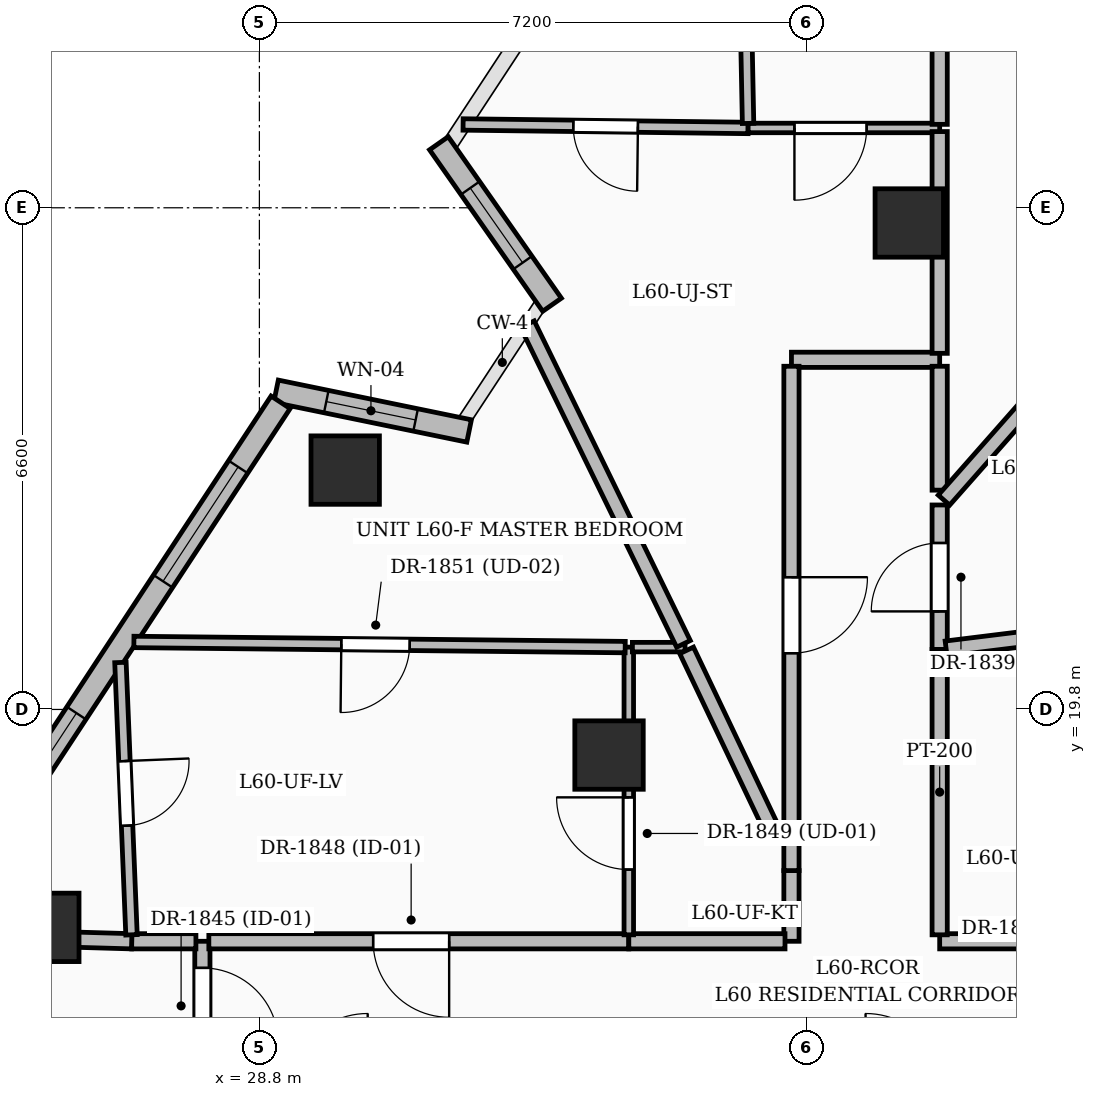
"""IFC4 building model, lengths in metres.
Left out: names, types, materials, properties, quantities, classifications, styles, units other than length and angle.
Written with IfcOpenShell. Run it as: python <this file> out.ifc"""

import sys

from ifc_helpers import new_model, si_unit, direction, frame, frame_2d, origin, origin_2d, place, context, subcontext, project, spatial, rectangle, extrude, element, fill, save


model = new_model("IFC4")
c1 = context("Model", 3, precision=1e-05, world=origin(), true_north=direction((0.0, 1.0)))
c2 = subcontext(c1, "Body", "Model", "MODEL_VIEW")
j1 = project(units=[si_unit("LENGTHUNIT", "METRE"), si_unit("PLANEANGLEUNIT", "RADIAN")], contexts=[c1])
p1 = place(None, origin())
s1 = spatial("IfcSite", under=j1, at=p1, CompositionType="ELEMENT")
p2 = place(p1, origin())
s2 = spatial("IfcBuilding", under=s1, at=p2, CompositionType="ELEMENT")
p3 = place(p2, frame((0.0, 0.0, 233.25)))
s3 = spatial("IfcBuildingStorey", under=s2, at=p3, CompositionType="ELEMENT", Elevation=233.25)
for number, where, z_axis, x_axis in (
    (1, (37.35, 26.2, 0.0), (0.0, 0.0, 1.0), (1.0, 0.0, 0.0)),
    (2, (33.4, 19.2, 0.0), (0.0, 0.0, 1.0), (1.0, 0.0, 0.0)),
    (3, (29.929, 22.949, 0.0), (0.0, 0.0, 1.0), (1.0, 0.0, 0.0)),
    (4, (25.977, 16.933, 0.0), (0.0, 0.0, 1.0), (1.0, 0.0, 0.0)),
):
    element("IfcColumn", number, at=place(p3, frame(where, z_axis=z_axis, x_axis=x_axis)), inside=s3, PredefinedType="COLUMN", context=c2, shape_type="SweptSolid", body=[
        extrude(rectangle(XDim=0.9, YDim=0.9, at=origin_2d()), origin(), (0.0, 0.0, 1.0), 3.75),
    ])
p4 = place(p3, frame((29.019, 23.986, 0.0), z_axis=(0.0, 0.0, 1.0), x_axis=(0.97951660883, -0.201363385515, 0.0)))
e5 = element("IfcWall", 5, at=p4, inside=s3, PredefinedType="SOLIDWALL", context=c2, shape_type="SweptSolid", body=[
    extrude(rectangle(XDim=2.594, YDim=0.3, at=frame_2d((1.297, 0.0))), origin(), (0.0, 0.0, 1.0), 2.825),
])
p5 = place(p4, frame((0.675, 0.0, 0.8)))
e6 = element("IfcOpeningElement", 6, at=p5, cuts=e5, PredefinedType="OPENING", context=c2, shape_type="SweptSolid", body=[
    extrude(rectangle(XDim=1.2, YDim=1.8, at=frame_2d((0.6, 0.9))), frame((0.0, 0.16, 0.0), z_axis=(0.0, -1.0, 0.0), x_axis=(1.0, 0.0, 0.0)), (0.0, 0.0, 1.0), 0.32),
])
p6 = place(p3, frame((32.65, 25.125, 0.0), z_axis=(0.0, 0.0, 1.0), x_axis=(-0.573967598523, 0.818878010356, 0.0)))
e7 = element("IfcWall", 7, at=p6, inside=s3, PredefinedType="SOLIDWALL", context=c2, shape_type="SweptSolid", body=[
    extrude(rectangle(XDim=2.594, YDim=0.3, at=frame_2d((1.297, 0.0))), origin(), (0.0, 0.0, 1.0), 2.825),
])
p7 = place(p6, frame((0.675, 0.0, 0.8)))
e8 = element("IfcOpeningElement", 8, at=p7, cuts=e7, PredefinedType="OPENING", context=c2, shape_type="SweptSolid", body=[
    extrude(rectangle(XDim=1.2, YDim=1.8, at=frame_2d((0.6, 0.9))), frame((0.0, 0.16, 0.0), z_axis=(0.0, -1.0, 0.0), x_axis=(1.0, 0.0, 0.0)), (0.0, 0.0, 1.0), 0.32),
])
p8 = place(p3, frame((25.062, 17.725, 0.0), z_axis=(0.0, 0.0, 1.0), x_axis=(0.549051383212, 0.835788596831, 0.0)))
e9 = element("IfcWall", 9, at=p8, inside=s3, PredefinedType="SOLIDWALL", context=c2, shape_type="SweptSolid", body=[
    extrude(rectangle(XDim=7.317, YDim=0.3, at=frame_2d((3.659, 0.0))), origin(), (0.0, 0.0, 1.0), 3.5),
])
p9 = place(p8, frame((0.625, 0.0, 0.6)))
e10 = element("IfcOpeningElement", 10, at=p9, cuts=e9, PredefinedType="OPENING", context=c2, shape_type="SweptSolid", body=[
    extrude(rectangle(XDim=1.8, YDim=2.1, at=frame_2d((0.9, 1.05))), frame((0.0, 0.16, 0.0), z_axis=(0.0, -1.0, 0.0), x_axis=(1.0, 0.0, 0.0)), (0.0, 0.0, 1.0), 0.32),
])
p10 = place(p8, frame((4.5, 0.0, 0.6)))
e11 = element("IfcOpeningElement", 11, at=p10, cuts=e9, PredefinedType="OPENING", context=c2, shape_type="SweptSolid", body=[
    extrude(rectangle(XDim=1.8, YDim=2.1, at=frame_2d((0.9, 1.05))), frame((0.0, 0.16, 0.0), z_axis=(0.0, -1.0, 0.0), x_axis=(1.0, 0.0, 0.0)), (0.0, 0.0, 1.0), 0.32),
])
p11 = place(p3, frame((28.05, 16.75, 0.0), z_axis=(0.0, 0.0, 1.0), x_axis=(0.0, -1.0, 0.0)))
e12 = element("IfcWall", 12, at=p11, inside=s3, PredefinedType="PARTITIONING", context=c2, shape_type="SweptSolid", body=[
    extrude(rectangle(XDim=1.7, YDim=0.2, at=frame_2d((0.85, 0.0))), origin(), (0.0, 0.0, 1.0), 3.5),
])
p12 = place(p11, frame((0.35, 0.0, 0.0)))
e13 = element("IfcOpeningElement", 13, at=p12, cuts=e12, PredefinedType="OPENING", context=c2, shape_type="SweptSolid", body=[
    extrude(rectangle(XDim=1.0, YDim=2.2, at=frame_2d((0.5, 1.1))), frame((0.0, 0.11, 0.0), z_axis=(0.0, -1.0, 0.0), x_axis=(1.0, 0.0, 0.0)), (0.0, 0.0, 1.0), 0.22),
])
p13 = place(p3, frame((33.66, 16.75, 0.0), z_axis=(0.0, 0.0, 1.0), x_axis=(-1.0, 0.0, 0.0)))
e14 = element("IfcWall", 14, at=p13, inside=s3, PredefinedType="PARTITIONING", context=c2, shape_type="SweptSolid", body=[
    extrude(rectangle(XDim=5.525, YDim=0.2, at=frame_2d((2.762, 0.0))), origin(), (0.0, 0.0, 1.0), 3.5),
])
p14 = place(p13, frame((2.364, 0.0, 0.0)))
e15 = element("IfcOpeningElement", 15, at=p14, cuts=e14, PredefinedType="OPENING", context=c2, shape_type="SweptSolid", body=[
    extrude(rectangle(XDim=1.0, YDim=2.2, at=frame_2d((0.5, 1.1))), frame((0.0, 0.11, 0.0), z_axis=(0.0, -1.0, 0.0), x_axis=(1.0, 0.0, 0.0)), (0.0, 0.0, 1.0), 0.22),
])
p15 = place(p3, frame((35.8, 17.68, 0.0), z_axis=(0.0, 0.0, 1.0), x_axis=(0.0, -1.0, 0.0)))
e16 = element("IfcWall", 16, at=p15, inside=s3, PredefinedType="PARTITIONING", context=c2, shape_type="SweptSolid", body=[
    extrude(rectangle(XDim=0.93, YDim=0.2, at=frame_2d((0.465, 0.0))), origin(), (0.0, 0.0, 1.0), 3.5),
])
p16 = place(p3, frame((35.715, 16.75, 0.0), z_axis=(0.0, 0.0, 1.0), x_axis=(-1.0, 0.0, 0.0)))
e17 = element("IfcWall", 17, at=p16, inside=s3, PredefinedType="PARTITIONING", context=c2, shape_type="SweptSolid", body=[
    extrude(rectangle(XDim=2.055, YDim=0.2, at=frame_2d((1.028, 0.0))), origin(), (0.0, 0.0, 1.0), 2.685),
])
p17 = place(p3, frame((39.96, 16.75, 0.0), z_axis=(0.0, 0.0, 1.0), x_axis=(-1.0, 0.0, 0.0)))
e18 = element("IfcWall", 18, at=p17, inside=s3, PredefinedType="PARTITIONING", context=c2, shape_type="SweptSolid", body=[
    extrude(rectangle(XDim=2.21, YDim=0.2, at=frame_2d((1.105, 0.0))), origin(), (0.0, 0.0, 1.0), 3.5),
])
p18 = place(p3, frame((37.75, 16.835, 0.0), z_axis=(0.0, 0.0, 1.0), x_axis=(0.0, 1.0, 0.0)))
e19 = element("IfcWall", 19, at=p18, inside=s3, PredefinedType="PARTITIONING", context=c2, shape_type="SweptSolid", body=[
    extrude(rectangle(XDim=3.755, YDim=0.2, at=frame_2d((1.877, 0.0))), origin(), (0.0, 0.0, 1.0), 3.5),
])
p19 = place(p3, frame((37.75, 20.59, 0.0), z_axis=(0.0, 0.0, 1.0), x_axis=(0.0, 1.0, 0.0)))
e20 = element("IfcWall", 20, at=p19, inside=s3, PredefinedType="PARTITIONING", context=c2, shape_type="SweptSolid", body=[
    extrude(rectangle(XDim=1.9, YDim=0.2, at=frame_2d((0.95, 0.0))), origin(), (0.0, 0.0, 1.0), 3.5),
])
p20 = place(p19, frame((0.5, 0.0, 0.0)))
e21 = element("IfcOpeningElement", 21, at=p20, cuts=e20, PredefinedType="OPENING", context=c2, shape_type="SweptSolid", body=[
    extrude(rectangle(XDim=0.9, YDim=2.1, at=frame_2d((0.45, 1.05))), frame((0.0, 0.11, 0.0), z_axis=(0.0, -1.0, 0.0), x_axis=(1.0, 0.0, 0.0)), (0.0, 0.0, 1.0), 0.22),
])
p21 = place(p3, frame((37.75, 24.4, 0.0), z_axis=(0.0, 0.0, 1.0), x_axis=(-1.0, 0.0, 0.0)))
e22 = element("IfcWall", 22, at=p21, inside=s3, PredefinedType="PARTITIONING", context=c2, shape_type="SweptSolid", body=[
    extrude(rectangle(XDim=1.95, YDim=0.2, at=frame_2d((0.975, 0.0))), origin(), (0.0, 0.0, 1.0), 2.685),
])
p22 = place(p3, frame((35.8, 24.315, 0.0), z_axis=(0.0, 0.0, 1.0), x_axis=(0.0, -1.0, 0.0)))
e23 = element("IfcWall", 23, at=p22, inside=s3, PredefinedType="PARTITIONING", context=c2, shape_type="SweptSolid", body=[
    extrude(rectangle(XDim=6.635, YDim=0.2, at=frame_2d((3.317, 0.0))), origin(), (0.0, 0.0, 1.0), 2.685),
])
p23 = place(p22, frame((2.775, 0.0, 0.0)))
e24 = element("IfcOpeningElement", 24, at=p23, cuts=e23, PredefinedType="OPENING", context=c2, shape_type="SweptSolid", body=[
    extrude(rectangle(XDim=1.0, YDim=2.2, at=frame_2d((0.5, 1.1))), frame((0.0, 0.11, 0.0), z_axis=(0.0, -1.0, 0.0), x_axis=(1.0, 0.0, 0.0)), (0.0, 0.0, 1.0), 0.22),
])
p24 = place(p3, frame((37.75, 22.685, 0.0), z_axis=(0.0, 0.0, 1.0), x_axis=(0.0, 1.0, 0.0)))
e25 = element("IfcWall", 25, at=p24, inside=s3, PredefinedType="PARTITIONING", context=c2, shape_type="SweptSolid", body=[
    extrude(rectangle(XDim=1.63, YDim=0.2, at=frame_2d((0.815, 0.0))), origin(), (0.0, 0.0, 1.0), 3.5),
])
p25 = place(p3, frame((27.965, 16.75, 0.0), z_axis=(0.0, 0.0, 1.0), x_axis=(-1.0, 0.0, 0.0)))
e26 = element("IfcWall", 26, at=p25, inside=s3, PredefinedType="PARTITIONING", context=c2, shape_type="SweptSolid", body=[
    extrude(rectangle(XDim=0.845, YDim=0.2, at=frame_2d((0.422, 0.0))), origin(), (0.0, 0.0, 1.0), 3.061),
])
p26 = place(p3, frame((27.12, 16.75, 0.0), z_axis=(0.0, 0.0, 1.0), x_axis=(-0.999588989249, 0.028667971206, 0.0)))
e27 = element("IfcWall", 27, at=p26, inside=s3, PredefinedType="PARTITIONING", context=c2, shape_type="SweptSolid", body=[
    extrude(rectangle(XDim=2.512, YDim=0.2, at=frame_2d((1.256, 0.0))), origin(), (0.0, 0.0, 1.0), 3.5),
])
p27 = place(p3, frame((26.972, 20.418, 0.0), z_axis=(0.0, 0.0, 1.0), x_axis=(0.040645044175, -0.999173648764, 0.0)))
e28 = element("IfcWall", 28, at=p27, inside=s3, PredefinedType="PARTITIONING", context=c2, shape_type="SweptSolid", body=[
    extrude(rectangle(XDim=3.586, YDim=0.15, at=frame_2d((1.793, 0.0))), origin(), (0.0, 0.0, 1.0), 2.82),
])
p28 = place(p27, frame((1.298, 0.0, 0.0)))
e29 = element("IfcOpeningElement", 29, at=p28, cuts=e28, PredefinedType="OPENING", context=c2, shape_type="SweptSolid", body=[
    extrude(rectangle(XDim=0.85, YDim=2.1, at=frame_2d((0.425, 1.05))), frame((0.0, 0.085, 0.0), z_axis=(0.0, -1.0, 0.0), x_axis=(1.0, 0.0, 0.0)), (0.0, 0.0, 1.0), 0.17),
])
p29 = place(p3, frame((33.66, 16.835, 0.0), z_axis=(0.0, 0.0, 1.0), x_axis=(0.0, 1.0, 0.0)))
e30 = element("IfcWall", 30, at=p29, inside=s3, PredefinedType="PARTITIONING", context=c2, shape_type="SweptSolid", body=[
    extrude(rectangle(XDim=3.785, YDim=0.125, at=frame_2d((1.893, 0.0))), origin(), (0.0, 0.0, 1.0), 2.685),
])
p30 = place(p29, frame((0.858, 0.0, 0.0)))
e31 = element("IfcOpeningElement", 31, at=p30, cuts=e30, PredefinedType="OPENING", context=c2, shape_type="SweptSolid", body=[
    extrude(rectangle(XDim=0.95, YDim=2.2, at=frame_2d((0.475, 1.1))), frame((0.0, 0.072, 0.0), z_axis=(0.0, -1.0, 0.0), x_axis=(1.0, 0.0, 0.0)), (0.0, 0.0, 1.0), 0.145),
])
p31 = place(p3, frame((33.613, 20.62, 0.0), z_axis=(0.0, 0.0, 1.0), x_axis=(-0.999945270441, 0.010462128042, 0.0)))
e32 = element("IfcWall", 32, at=p31, inside=s3, PredefinedType="PARTITIONING", context=c2, shape_type="SweptSolid", body=[
    extrude(rectangle(XDim=6.464, YDim=0.15, at=frame_2d((3.232, 0.0))), origin(), (0.0, 0.0, 1.0), 2.685),
])
p32 = place(p31, frame((2.835, 0.0, 0.0)))
e33 = element("IfcOpeningElement", 33, at=p32, cuts=e32, PredefinedType="OPENING", context=c2, shape_type="SweptSolid", body=[
    extrude(rectangle(XDim=0.9, YDim=2.15, at=frame_2d((0.45, 1.075))), frame((0.0, 0.085, 0.0), z_axis=(0.0, -1.0, 0.0), x_axis=(1.0, 0.0, 0.0)), (0.0, 0.0, 1.0), 0.17),
])
p33 = place(p3, frame((34.4, 20.62, 0.0), z_axis=(0.0, 0.0, 1.0), x_axis=(-1.0, 0.0, 0.0)))
e34 = element("IfcWall", 34, at=p33, inside=s3, PredefinedType="PARTITIONING", context=c2, shape_type="SweptSolid", body=[
    extrude(rectangle(XDim=0.692, YDim=0.125, at=frame_2d((0.346, 0.0))), origin(), (0.0, 0.0, 1.0), 2.685),
])
p34 = place(p3, frame((35.6, 18.1, 0.0), z_axis=(0.0, 0.0, 1.0), x_axis=(-0.429975029467, 0.902840780002, 0.0)))
e35 = element("IfcWall", 35, at=p34, inside=s3, PredefinedType="PARTITIONING", context=c2, shape_type="SweptSolid", body=[
    extrude(rectangle(XDim=2.744, YDim=0.2, at=frame_2d((1.372, 0.0))), origin(), (0.0, 0.0, 1.0), 2.685),
])
p35 = place(p3, frame((34.379, 20.663, 0.0), z_axis=(0.0, 0.0, 1.0), x_axis=(-0.438742234656, 0.898612959805, 0.0)))
e36 = element("IfcWall", 36, at=p35, inside=s3, PredefinedType="PARTITIONING", context=c2, shape_type="SweptSolid", body=[
    extrude(rectangle(XDim=4.68, YDim=0.2, at=frame_2d((2.34, 0.0))), origin(), (0.0, 0.0, 1.0), 2.685),
])
p36 = place(p3, frame((40.693, 20.954, 0.0), z_axis=(0.0, 0.0, 1.0), x_axis=(-0.992428411634, -0.122824459212, 0.0)))
e37 = element("IfcWall", 37, at=p36, inside=s3, PredefinedType="PARTITIONING", context=c2, shape_type="SweptSolid", body=[
    extrude(rectangle(XDim=2.88, YDim=0.2, at=frame_2d((1.44, 0.0))), origin(), (0.0, 0.0, 1.0), 3.5),
])
p37 = place(p3, frame((44.11, 29.699, 0.0), z_axis=(0.0, 0.0, 1.0), x_axis=(-0.661580960231, -0.749873744746, 0.0)))
e38 = element("IfcWall", 38, at=p37, inside=s3, PredefinedType="PARTITIONING", context=c2, shape_type="SweptSolid", body=[
    extrude(rectangle(XDim=9.529, YDim=0.2, at=frame_2d((4.764, 0.0))), origin(), (0.0, 0.0, 1.0), 2.685),
])
p38 = place(p3, frame((35.23, 27.45, 0.0), z_axis=(0.0, 0.0, 1.0), x_axis=(-0.999924305928, 0.012303756108, 0.0)))
e39 = element("IfcWall", 39, at=p38, inside=s3, PredefinedType="PARTITIONING", context=c2, shape_type="SweptSolid", body=[
    extrude(rectangle(XDim=3.75, YDim=0.15, at=frame_2d((1.875, 0.0))), origin(), (0.0, 0.0, 1.0), 2.82),
])
p39 = place(p38, frame((1.45, 0.0, 0.0)))
e40 = element("IfcOpeningElement", 40, at=p39, cuts=e39, PredefinedType="OPENING", context=c2, shape_type="SweptSolid", body=[
    extrude(rectangle(XDim=0.85, YDim=2.1, at=frame_2d((0.425, 1.05))), frame((0.0, 0.085, 0.0), z_axis=(0.0, -1.0, 0.0), x_axis=(1.0, 0.0, 0.0)), (0.0, 0.0, 1.0), 0.17),
])
p40 = place(p3, frame((37.75, 27.45, 0.0), z_axis=(0.0, 0.0, 1.0), x_axis=(-1.0, 0.0, 0.0)))
e41 = element("IfcWall", 41, at=p40, inside=s3, PredefinedType="PARTITIONING", context=c2, shape_type="SweptSolid", body=[
    extrude(rectangle(XDim=2.52, YDim=0.125, at=frame_2d((1.26, 0.0))), origin(), (0.0, 0.0, 1.0), 2.685),
])
p41 = place(p40, frame((0.961, 0.0, 0.0)))
e42 = element("IfcOpeningElement", 42, at=p41, cuts=e41, PredefinedType="OPENING", context=c2, shape_type="SweptSolid", body=[
    extrude(rectangle(XDim=0.95, YDim=2.2, at=frame_2d((0.475, 1.1))), frame((0.0, 0.072, 0.0), z_axis=(0.0, -1.0, 0.0), x_axis=(1.0, 0.0, 0.0)), (0.0, 0.0, 1.0), 0.145),
])
p42 = place(p3, frame((37.75, 24.485, 0.0), z_axis=(0.0, 0.0, 1.0), x_axis=(0.0, 1.0, 0.0)))
e43 = element("IfcWall", 43, at=p42, inside=s3, PredefinedType="PARTITIONING", context=c2, shape_type="SweptSolid", body=[
    extrude(rectangle(XDim=2.917, YDim=0.2, at=frame_2d((1.459, 0.0))), origin(), (0.0, 0.0, 1.0), 2.685),
])
p43 = place(p3, frame((35.229, 27.51, 0.0), z_axis=(0.0, 0.0, 1.0), x_axis=(-0.01987614649, 0.999802449887, 0.0)))
e44 = element("IfcWall", 44, at=p43, inside=s3, PredefinedType="PARTITIONING", context=c2, shape_type="SweptSolid", body=[
    extrude(rectangle(XDim=5.294, YDim=0.15, at=frame_2d((2.647, 0.0))), origin(), (0.0, 0.0, 1.0), 2.685),
])
p44 = place(p3, frame((37.75, 27.498, 0.0), z_axis=(0.0, 0.0, 1.0), x_axis=(0.0, 1.0, 0.0)))
e45 = element("IfcWall", 45, at=p44, inside=s3, PredefinedType="PARTITIONING", context=c2, shape_type="SweptSolid", body=[
    extrude(rectangle(XDim=3.323, YDim=0.2, at=frame_2d((1.661, 0.0))), origin(), (0.0, 0.0, 1.0), 2.82),
])
p45 = place(p44, frame((1.137, 0.0, 0.0)))
e46 = element("IfcOpeningElement", 46, at=p45, cuts=e45, PredefinedType="OPENING", context=c2, shape_type="SweptSolid", body=[
    extrude(rectangle(XDim=1.0, YDim=2.2, at=frame_2d((0.5, 1.1))), frame((0.0, 0.11, 0.0), z_axis=(0.0, -1.0, 0.0), x_axis=(1.0, 0.0, 0.0)), (0.0, 0.0, 1.0), 0.22),
])
p46 = place(p5, origin())
e47 = element("IfcWindow", 47, at=p46, inside=s3, PartitioningType="SINGLE_PANEL", PredefinedType="WINDOW", context=c2, shape_type="SweptSolid", body=[
    extrude(rectangle(XDim=1.2, YDim=1.8, at=frame_2d((0.6, 0.9))), frame((0.0, 0.03, 0.0), z_axis=(0.0, -1.0, 0.0), x_axis=(1.0, 0.0, 0.0)), (0.0, 0.0, 1.0), 0.06),
])
fill(e6, e47)
p47 = place(p7, origin())
e48 = element("IfcWindow", 48, at=p47, inside=s3, PartitioningType="SINGLE_PANEL", PredefinedType="WINDOW", context=c2, shape_type="SweptSolid", body=[
    extrude(rectangle(XDim=1.2, YDim=1.8, at=frame_2d((0.6, 0.9))), frame((0.0, 0.03, 0.0), z_axis=(0.0, -1.0, 0.0), x_axis=(1.0, 0.0, 0.0)), (0.0, 0.0, 1.0), 0.06),
])
fill(e8, e48)
p48 = place(p9, origin())
e49 = element("IfcWindow", 49, at=p48, inside=s3, PartitioningType="SINGLE_PANEL", PredefinedType="WINDOW", context=c2, shape_type="SweptSolid", body=[
    extrude(rectangle(XDim=1.8, YDim=2.1, at=frame_2d((0.9, 1.05))), frame((0.0, 0.03, 0.0), z_axis=(0.0, -1.0, 0.0), x_axis=(1.0, 0.0, 0.0)), (0.0, 0.0, 1.0), 0.06),
])
fill(e10, e49)
p49 = place(p10, origin())
e50 = element("IfcWindow", 50, at=p49, inside=s3, PartitioningType="SINGLE_PANEL", PredefinedType="WINDOW", context=c2, shape_type="SweptSolid", body=[
    extrude(rectangle(XDim=1.8, YDim=2.1, at=frame_2d((0.9, 1.05))), frame((0.0, 0.03, 0.0), z_axis=(0.0, -1.0, 0.0), x_axis=(1.0, 0.0, 0.0)), (0.0, 0.0, 1.0), 0.06),
])
fill(e11, e50)
p50 = place(p20, origin())
e51 = element("IfcDoor", 51, at=p50, inside=s3, OperationType="SINGLE_SWING_LEFT", PredefinedType="DOOR", context=c2, shape_type="SweptSolid", body=[
    extrude(rectangle(XDim=0.9, YDim=2.1, at=frame_2d((0.45, 1.05))), frame((0.0, 0.025, 0.0), z_axis=(0.0, -1.0, 0.0), x_axis=(1.0, 0.0, 0.0)), (0.0, 0.0, 1.0), 0.05),
])
fill(e21, e51)
p51 = place(p12, origin())
e52 = element("IfcDoor", 52, at=p51, inside=s3, OperationType="SINGLE_SWING_RIGHT", PredefinedType="DOOR", context=c2, shape_type="SweptSolid", body=[
    extrude(rectangle(XDim=1.0, YDim=2.2, at=frame_2d((0.5, 1.1))), frame((0.0, 0.025, 0.0), z_axis=(0.0, -1.0, 0.0), x_axis=(1.0, 0.0, 0.0)), (0.0, 0.0, 1.0), 0.05),
])
fill(e13, e52)
p52 = place(p14, origin())
e53 = element("IfcDoor", 53, at=p52, inside=s3, OperationType="SINGLE_SWING_LEFT", PredefinedType="DOOR", context=c2, shape_type="SweptSolid", body=[
    extrude(rectangle(XDim=1.0, YDim=2.2, at=frame_2d((0.5, 1.1))), frame((0.0, 0.025, 0.0), z_axis=(0.0, -1.0, 0.0), x_axis=(1.0, 0.0, 0.0)), (0.0, 0.0, 1.0), 0.05),
])
fill(e15, e53)
p53 = place(p30, origin())
e54 = element("IfcDoor", 54, at=p53, inside=s3, OperationType="SINGLE_SWING_RIGHT", PredefinedType="DOOR", context=c2, shape_type="SweptSolid", body=[
    extrude(rectangle(XDim=0.95, YDim=2.2, at=frame_2d((0.475, 1.1))), frame((0.0, 0.025, 0.0), z_axis=(0.0, -1.0, 0.0), x_axis=(1.0, 0.0, 0.0)), (0.0, 0.0, 1.0), 0.05),
])
fill(e31, e54)
p54 = place(p28, origin())
e55 = element("IfcDoor", 55, at=p54, inside=s3, OperationType="SINGLE_SWING_LEFT", PredefinedType="DOOR", context=c2, shape_type="SweptSolid", body=[
    extrude(rectangle(XDim=0.85, YDim=2.1, at=frame_2d((0.425, 1.05))), frame((0.0, 0.025, 0.0), z_axis=(0.0, -1.0, 0.0), x_axis=(1.0, 0.0, 0.0)), (0.0, 0.0, 1.0), 0.05),
])
fill(e29, e55)
p55 = place(p32, origin())
e56 = element("IfcDoor", 56, at=p55, inside=s3, OperationType="SINGLE_SWING_RIGHT", PredefinedType="DOOR", context=c2, shape_type="SweptSolid", body=[
    extrude(rectangle(XDim=0.9, YDim=2.15, at=frame_2d((0.45, 1.075))), frame((0.0, 0.025, 0.0), z_axis=(0.0, -1.0, 0.0), x_axis=(1.0, 0.0, 0.0)), (0.0, 0.0, 1.0), 0.05),
])
fill(e33, e56)
p56 = place(p23, origin())
e57 = element("IfcDoor", 57, at=p56, inside=s3, OperationType="SINGLE_SWING_LEFT", PredefinedType="DOOR", context=c2, shape_type="SweptSolid", body=[
    extrude(rectangle(XDim=1.0, YDim=2.2, at=frame_2d((0.5, 1.1))), frame((0.0, 0.025, 0.0), z_axis=(0.0, -1.0, 0.0), x_axis=(1.0, 0.0, 0.0)), (0.0, 0.0, 1.0), 0.05),
])
fill(e24, e57)
p57 = place(p41, origin())
e58 = element("IfcDoor", 58, at=p57, inside=s3, OperationType="SINGLE_SWING_RIGHT", PredefinedType="DOOR", context=c2, shape_type="SweptSolid", body=[
    extrude(rectangle(XDim=0.95, YDim=2.2, at=frame_2d((0.475, 1.1))), frame((0.0, 0.025, 0.0), z_axis=(0.0, -1.0, 0.0), x_axis=(1.0, 0.0, 0.0)), (0.0, 0.0, 1.0), 0.05),
])
fill(e42, e58)
p58 = place(p39, origin())
e59 = element("IfcDoor", 59, at=p58, inside=s3, OperationType="SINGLE_SWING_LEFT", PredefinedType="DOOR", context=c2, shape_type="SweptSolid", body=[
    extrude(rectangle(XDim=0.85, YDim=2.1, at=frame_2d((0.425, 1.05))), frame((0.0, 0.025, 0.0), z_axis=(0.0, -1.0, 0.0), x_axis=(1.0, 0.0, 0.0)), (0.0, 0.0, 1.0), 0.05),
])
fill(e40, e59)
save(model, sys.argv[1])
